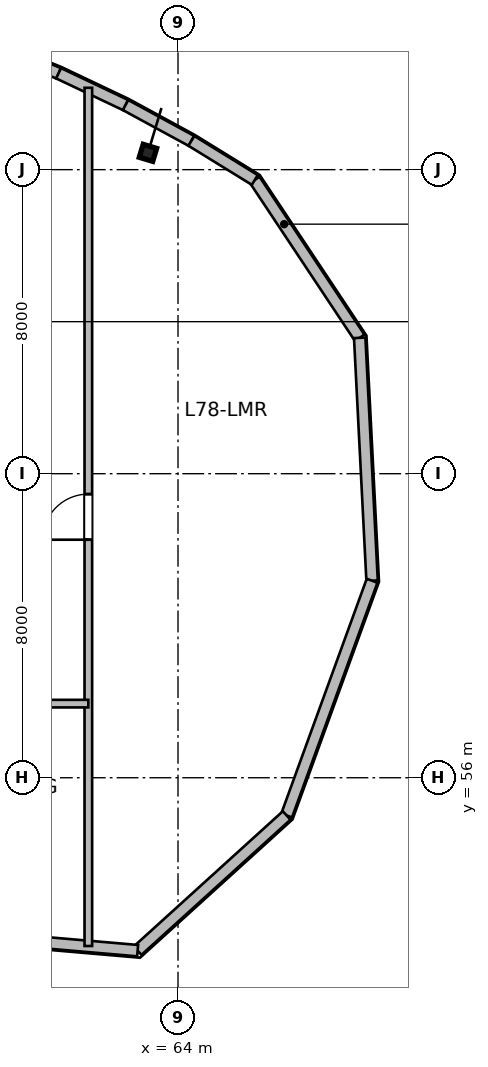
"""IFC4 building model, lengths in metres.
Left out: names, types, materials, properties, quantities, classifications, styles, units other than length and angle.
Written with IfcOpenShell. Run it as: python <this file> out.ifc"""

import sys

from ifc_helpers import new_model, si_unit, direction, frame, frame_2d, origin, origin_2d, place, context, subcontext, project, spatial, rectangle, i_section, extrude, source, transform, mapped, element, fill, save


model = new_model("IFC4")
c1 = context("Model", 3, precision=1e-05, world=origin(), true_north=direction((0.0, 1.0)))
c2 = subcontext(c1, "Body", "Model", "MODEL_VIEW")
j1 = project(units=[si_unit("LENGTHUNIT", "METRE"), si_unit("PLANEANGLEUNIT", "RADIAN")], contexts=[c1])
p1 = place(None, origin())
s1 = spatial("IfcSite", under=j1, at=p1, CompositionType="ELEMENT")
p2 = place(p1, origin())
s2 = spatial("IfcBuilding", under=s1, at=p2, CompositionType="ELEMENT")
p3 = place(p2, frame((0.0, 0.0, 323.4)))
s3 = spatial("IfcBuildingStorey", under=s2, at=p3, CompositionType="ELEMENT", Elevation=323.4)
m1 = source(origin(), c2, "Body", "SweptSolid", [
    extrude(i_section(OverallWidth=0.369, OverallDepth=0.356, WebThickness=0.011, FlangeThickness=0.018, at=origin_2d()), origin(), (0.0, 0.0, 1.0), 4.8),
])
p4 = place(p3, frame((63.209, 72.442, 0.0), z_axis=(0.0, 0.0, 1.0), x_axis=(0.288697611798, 0.957420330337, 0.0)))
e1 = element("IfcColumn", 1, at=p4, inside=s3, PredefinedType="COLUMN", context=c2, shape_type="MappedRepresentation", body=[
    mapped(m1, transform((0.0, 0.0, 0.0), scale=1.0)),
])
m2 = source(origin(), c2, "Body", "SweptSolid", [
    extrude(rectangle(XDim=4.988, YDim=0.3, at=frame_2d((2.494, 0.0))), origin(), (0.0, 0.0, 1.0), 4.59),
])
p5 = place(p3, frame((66.021, 71.729, 0.0), z_axis=(0.0, 0.0, 1.0), x_axis=(0.553468328856, -0.832870223356, 0.0)))
e2 = element("IfcWall", 2, at=p5, inside=s3, PredefinedType="SOLIDWALL", context=c2, shape_type="MappedRepresentation", body=[
    mapped(m2, transform((0.0, 0.0, 0.0), scale=1.0)),
])
m3 = source(origin(), c2, "Body", "SweptSolid", [
    extrude(rectangle(XDim=6.4, YDim=0.3, at=frame_2d((3.2, 0.0))), origin(), (0.0, 0.0, 1.0), 4.59),
])
p6 = place(p3, frame((68.781, 67.575, 0.0), z_axis=(0.0, 0.0, 1.0), x_axis=(0.050888906156, -0.998704320222, 0.0)))
e3 = element("IfcWall", 3, at=p6, inside=s3, PredefinedType="SOLIDWALL", context=c2, shape_type="MappedRepresentation", body=[
    mapped(m3, transform((0.0, 0.0, 0.0), scale=1.0)),
])
m4 = source(origin(), c2, "Body", "SweptSolid", [
    extrude(rectangle(XDim=6.573, YDim=0.3, at=frame_2d((3.287, 0.0))), origin(), (0.0, 0.0, 1.0), 4.59),
])
p7 = place(p3, frame((69.107, 61.183, 0.0), z_axis=(0.0, 0.0, 1.0), x_axis=(-0.342017422465, -0.939693611094, 0.0)))
e4 = element("IfcWall", 4, at=p7, inside=s3, PredefinedType="SOLIDWALL", context=c2, shape_type="MappedRepresentation", body=[
    mapped(m4, transform((0.0, 0.0, 0.0), scale=1.0)),
])
m5 = source(origin(), c2, "Body", "SweptSolid", [
    extrude(rectangle(XDim=5.294, YDim=0.3, at=frame_2d((2.647, 0.0))), origin(), (0.0, 0.0, 1.0), 4.59),
])
p8 = place(p3, frame((66.859, 55.007, 0.0), z_axis=(0.0, 0.0, 1.0), x_axis=(-0.740695017527, -0.671841418052, 0.0)))
e5 = element("IfcWall", 5, at=p8, inside=s3, PredefinedType="SOLIDWALL", context=c2, shape_type="MappedRepresentation", body=[
    mapped(m5, transform((0.0, 0.0, 0.0), scale=1.0)),
])
m6 = source(origin(), c2, "Body", "SweptSolid", [
    extrude(rectangle(XDim=4.111, YDim=0.3, at=frame_2d((2.055, 0.0))), origin(), (0.0, 0.0, 1.0), 4.59),
])
p9 = place(p3, frame((62.938, 51.45, 0.0), z_axis=(0.0, 0.0, 1.0), x_axis=(-0.996300298771, 0.085940180764, 0.0)))
e6 = element("IfcWall", 6, at=p9, inside=s3, PredefinedType="SOLIDWALL", context=c2, shape_type="MappedRepresentation", body=[
    mapped(m6, transform((0.0, 0.0, 0.0), scale=1.0)),
])
m7 = source(origin(), c2, "Body", "SweptSolid", [
    extrude(rectangle(XDim=1.93, YDim=0.3, at=frame_2d((0.965, 0.0))), origin(), (0.0, 0.0, 1.0), 4.59),
])
p10 = place(p3, frame((59.07, 75.264, 0.0), z_axis=(0.0, 0.0, 1.0), x_axis=(0.926200349129, -0.377031713882, 0.0)))
e7 = element("IfcWall", 7, at=p10, inside=s3, PredefinedType="SOLIDWALL", context=c2, shape_type="MappedRepresentation", body=[
    mapped(m7, transform((0.0, 0.0, 0.0), scale=1.0)),
])
m8 = source(origin(), c2, "Body", "SweptSolid", [
    extrude(rectangle(XDim=1.95, YDim=0.3, at=frame_2d((0.975, 0.0))), origin(), (0.0, 0.0, 1.0), 4.59),
])
p11 = place(p3, frame((60.858, 74.536, 0.0), z_axis=(0.0, 0.0, 1.0), x_axis=(0.903429098402, -0.428737523621, 0.0)))
e8 = element("IfcWall", 8, at=p11, inside=s3, PredefinedType="SOLIDWALL", context=c2, shape_type="MappedRepresentation", body=[
    mapped(m8, transform((0.0, 0.0, 0.0), scale=1.0)),
])
m9 = source(origin(), c2, "Body", "SweptSolid", [
    extrude(rectangle(XDim=1.972, YDim=0.3, at=frame_2d((0.986, 0.0))), origin(), (0.0, 0.0, 1.0), 4.59),
])
p12 = place(p3, frame((62.62, 73.7, 0.0), z_axis=(0.0, 0.0, 1.0), x_axis=(0.878387239208, -0.477949639603, 0.0)))
e9 = element("IfcWall", 9, at=p12, inside=s3, PredefinedType="SOLIDWALL", context=c2, shape_type="MappedRepresentation", body=[
    mapped(m9, transform((0.0, 0.0, 0.0), scale=1.0)),
])
m10 = source(origin(), c2, "Body", "SweptSolid", [
    extrude(rectangle(XDim=1.96, YDim=0.3, at=frame_2d((0.98, 0.0))), origin(), (0.0, 0.0, 1.0), 4.59),
])
p13 = place(p3, frame((64.352, 72.758, 0.0), z_axis=(0.0, 0.0, 1.0), x_axis=(0.85131178833, -0.524660117647, 0.0)))
e10 = element("IfcWall", 10, at=p13, inside=s3, PredefinedType="SOLIDWALL", context=c2, shape_type="MappedRepresentation", body=[
    mapped(m10, transform((0.0, 0.0, 0.0), scale=1.0)),
])
m11 = source(origin(), c2, "Body", "SweptSolid", [
    extrude(rectangle(XDim=22.582, YDim=0.2, at=frame_2d((11.291, 0.0))), origin(), (0.0, 0.0, 1.0), 4.59),
])
p14 = place(p3, frame((61.64, 51.572, 0.0), z_axis=(0.0, 0.0, 1.0), x_axis=(0.0, 1.0, 0.0)))
e11 = element("IfcWall", 11, at=p14, inside=s3, PredefinedType="SOLIDWALL", context=c2, shape_type="MappedRepresentation", body=[
    mapped(m11, transform((0.0, 0.0, 0.0), scale=1.0)),
])
p15 = place(p14, frame((10.691, 0.0, 0.0)))
e12 = element("IfcOpeningElement", 12, at=p15, cuts=e11, PredefinedType="OPENING", context=c2, shape_type="SweptSolid", body=[
    extrude(rectangle(XDim=1.2, YDim=2.15, at=frame_2d((0.6, 1.075))), frame((0.0, 0.11, 0.0), z_axis=(0.0, -1.0, 0.0), x_axis=(1.0, 0.0, 0.0)), (0.0, 0.0, 1.0), 0.22),
])
m12 = source(origin(), c2, "Body", "SweptSolid", [
    extrude(rectangle(XDim=27.28, YDim=0.2, at=frame_2d((13.64, 0.0))), origin(), (0.0, 0.0, 1.0), 4.59),
])
p16 = place(p3, frame((34.36, 57.95, 0.0), z_axis=(0.0, 0.0, 1.0), x_axis=(1.0, 0.0, 0.0)))
e13 = element("IfcWall", 13, at=p16, inside=s3, PredefinedType="SOLIDWALL", context=c2, shape_type="MappedRepresentation", body=[
    mapped(m12, transform((0.0, 0.0, 0.0), scale=1.0)),
])
p17 = place(p16, frame((5.302, 0.0, 0.0)))
e14 = element("IfcOpeningElement", 14, at=p17, cuts=e13, PredefinedType="OPENING", context=c2, shape_type="SweptSolid", body=[
    extrude(rectangle(XDim=1.4, YDim=2.15, at=frame_2d((0.7, 1.075))), frame((0.0, 0.11, 0.0), z_axis=(0.0, -1.0, 0.0), x_axis=(1.0, 0.0, 0.0)), (0.0, 0.0, 1.0), 0.22),
])
m13 = source(origin(), c2, "Body", "SweptSolid", [
    extrude(rectangle(XDim=1.2, YDim=2.15, at=frame_2d((0.6, 1.075))), frame((0.0, 0.025, 0.0), z_axis=(0.0, -1.0, 0.0), x_axis=(1.0, 0.0, 0.0)), (0.0, 0.0, 1.0), 0.05),
])
p18 = place(p15, origin())
e15 = element("IfcDoor", 15, at=p18, inside=s3, OperationType="SINGLE_SWING_LEFT", PredefinedType="DOOR", context=c2, shape_type="MappedRepresentation", body=[
    mapped(m13, transform((0.0, 0.0, 0.0), scale=1.0)),
])
fill(e12, e15)
save(model, sys.argv[1])
